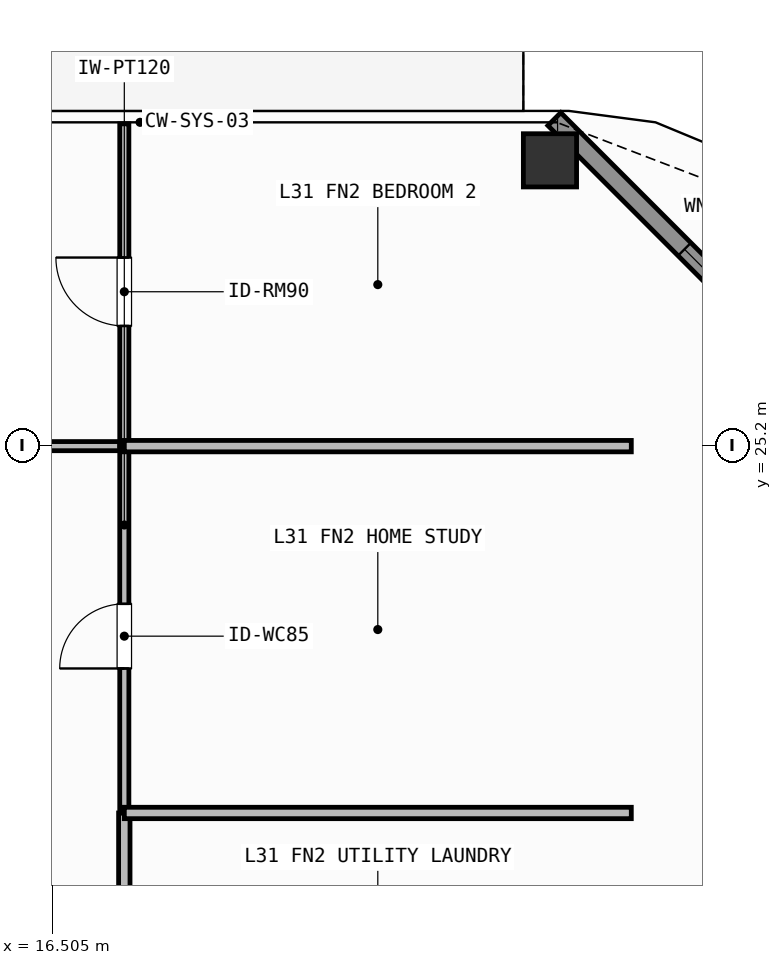
"""IFC4 building model, lengths in metres.
Left out: names, types, materials, properties, quantities, classifications, styles, units other than length and angle.
Written with IfcOpenShell. Run it as: python <this file> out.ifc"""

import sys

from ifc_helpers import new_model, si_unit, direction, frame, frame_2d, origin, origin_2d, place, context, subcontext, project, spatial, rectangle, hollow_rectangle, extrude, element, fill, save


model = new_model("IFC4")
c1 = context("Model", 3, precision=1e-05, world=origin(), true_north=direction((0.0, 1.0)))
c2 = subcontext(c1, "Body", "Model", "MODEL_VIEW")
j1 = project(units=[si_unit("LENGTHUNIT", "METRE"), si_unit("PLANEANGLEUNIT", "RADIAN")], contexts=[c1])
p1 = place(None, origin())
s1 = spatial("IfcSite", under=j1, at=p1, CompositionType="ELEMENT")
p2 = place(p1, origin())
s2 = spatial("IfcBuilding", under=s1, at=p2, CompositionType="ELEMENT")
p3 = place(p2, frame((0.0, 0.0, 125.1)))
s3 = spatial("IfcBuildingStorey", under=s2, at=p3, CompositionType="ELEMENT", Elevation=125.1)
p4 = place(p3, frame((23.05, 28.95, 0.0), z_axis=(0.0, 0.0, 1.0), x_axis=(1.0, 0.0, 0.0)))
e1 = element("IfcColumn", 1, at=p4, inside=s3, PredefinedType="COLUMN", context=c2, shape_type="SweptSolid", body=[
    extrude(hollow_rectangle(XDim=0.7, YDim=0.7, WallThickness=0.032, at=origin_2d()), origin(), (0.0, 0.0, 1.0), 3.9),
])
p5 = place(p3, frame((23.108, 29.492, 0.0), z_axis=(0.0, 0.0, 1.0), x_axis=(0.707087534163, -0.707126027686, 0.0)))
e2 = element("IfcWall", 2, at=p5, inside=s3, PredefinedType="SOLIDWALL", context=c2, shape_type="SweptSolid", body=[
    extrude(rectangle(XDim=6.342, YDim=0.24, at=frame_2d((3.171, 0.0))), origin(), (0.0, 0.0, 1.0), 3.68),
])
p6 = place(p5, frame((2.421, 0.0, 0.8)))
e3 = element("IfcOpeningElement", 3, at=p6, cuts=e2, PredefinedType="OPENING", context=c2, shape_type="SweptSolid", body=[
    extrude(rectangle(XDim=1.5, YDim=1.85, at=frame_2d((0.75, 0.925))), frame((0.0, 0.13, 0.0), z_axis=(0.0, -1.0, 0.0), x_axis=(1.0, 0.0, 0.0)), (0.0, 0.0, 1.0), 0.26),
])
p7 = place(p3, frame((11.444, 25.19, 0.0), z_axis=(0.0, 0.0, 1.0), x_axis=(1.0, 0.0, 0.0)))
e4 = element("IfcWall", 4, at=p7, inside=s3, PredefinedType="PARTITIONING", context=c2, shape_type="SweptSolid", body=[
    extrude(rectangle(XDim=6.006, YDim=0.12, at=frame_2d((3.003, 0.0))), origin(), (0.0, 0.0, 1.0), 3.68),
])
p8 = place(p7, frame((2.642, 0.0, 0.0)))
e5 = element("IfcOpeningElement", 5, at=p8, cuts=e4, PredefinedType="OPENING", context=c2, shape_type="SweptSolid", body=[
    extrude(rectangle(XDim=0.9, YDim=2.1, at=frame_2d((0.45, 1.05))), frame((0.0, 0.07, 0.0), z_axis=(0.0, -1.0, 0.0), x_axis=(1.0, 0.0, 0.0)), (0.0, 0.0, 1.0), 0.14),
])
p9 = place(p3, frame((17.45, 16.802, 0.0), z_axis=(0.0, 0.0, 1.0), x_axis=(0.0, 1.0, 0.0)))
e6 = element("IfcWall", 6, at=p9, inside=s3, PredefinedType="PARTITIONING", context=c2, shape_type="SweptSolid", body=[
    extrude(rectangle(XDim=3.562, YDim=0.15, at=frame_2d((1.781, 0.0))), origin(), (0.0, 0.0, 1.0), 3.68),
])
p10 = place(p9, frame((1.356, 0.0, 0.0)))
e7 = element("IfcOpeningElement", 7, at=p10, cuts=e6, PredefinedType="OPENING", context=c2, shape_type="SweptSolid", body=[
    extrude(rectangle(XDim=0.85, YDim=2.1, at=frame_2d((0.425, 1.05))), frame((0.0, 0.085, 0.0), z_axis=(0.0, -1.0, 0.0), x_axis=(1.0, 0.0, 0.0)), (0.0, 0.0, 1.0), 0.17),
])
p11 = place(p3, frame((17.45, 20.364, 0.0), z_axis=(0.0, 0.0, 1.0), x_axis=(0.0, 1.0, 0.0)))
e8 = element("IfcWall", 8, at=p11, inside=s3, PredefinedType="PARTITIONING", context=c2, shape_type="SweptSolid", body=[
    extrude(rectangle(XDim=4.826, YDim=0.12, at=frame_2d((2.413, 0.0))), origin(), (0.0, 0.0, 1.0), 3.68),
])
p12 = place(p11, frame((1.901, 0.0, 0.0)))
e9 = element("IfcOpeningElement", 9, at=p12, cuts=e8, PredefinedType="OPENING", context=c2, shape_type="SweptSolid", body=[
    extrude(rectangle(XDim=0.85, YDim=2.1, at=frame_2d((0.425, 1.05))), frame((0.0, 0.07, 0.0), z_axis=(0.0, -1.0, 0.0), x_axis=(1.0, 0.0, 0.0)), (0.0, 0.0, 1.0), 0.14),
])
p13 = place(p3, frame((17.45, 25.19, 0.0), z_axis=(0.0, 0.0, 1.0), x_axis=(0.0, 1.0, 0.0)))
e10 = element("IfcWall", 10, at=p13, inside=s3, PredefinedType="PARTITIONING", context=c2, shape_type="SweptSolid", body=[
    extrude(rectangle(XDim=4.24, YDim=0.12, at=frame_2d((2.12, 0.0))), origin(), (0.0, 0.0, 1.0), 3.68),
])
p14 = place(p13, frame((1.581, 0.0, 0.0)))
e11 = element("IfcOpeningElement", 11, at=p14, cuts=e10, PredefinedType="OPENING", context=c2, shape_type="SweptSolid", body=[
    extrude(rectangle(XDim=0.9, YDim=2.1, at=frame_2d((0.45, 1.05))), frame((0.0, 0.07, 0.0), z_axis=(0.0, -1.0, 0.0), x_axis=(1.0, 0.0, 0.0)), (0.0, 0.0, 1.0), 0.14),
])
for number, where, z_axis, x_axis in (
    (12, (17.45, 20.364, 0.0), (0.0, 0.0, 1.0), (1.0, 0.0, 0.0)),
    (13, (17.45, 25.19, 0.0), (0.0, 0.0, 1.0), (1.0, 0.0, 0.0)),
):
    element("IfcWall", number, at=place(p3, frame(where, z_axis=z_axis, x_axis=x_axis)), inside=s3, PredefinedType="PARTITIONING", context=c2, shape_type="SweptSolid", body=[
        extrude(rectangle(XDim=6.67, YDim=0.15, at=frame_2d((3.335, 0.0))), origin(), (0.0, 0.0, 1.0), 3.68),
    ])
p15 = place(p6, origin())
e14 = element("IfcWindow", 14, at=p15, inside=s3, PartitioningType="SINGLE_PANEL", PredefinedType="WINDOW", context=c2, shape_type="SweptSolid", body=[
    extrude(rectangle(XDim=1.5, YDim=1.85, at=frame_2d((0.75, 0.925))), frame((0.0, 0.03, 0.0), z_axis=(0.0, -1.0, 0.0), x_axis=(1.0, 0.0, 0.0)), (0.0, 0.0, 1.0), 0.06),
])
fill(e3, e14)
p16 = place(p12, origin())
e15 = element("IfcDoor", 15, at=p16, inside=s3, OperationType="SINGLE_SWING_LEFT", PredefinedType="DOOR", context=c2, shape_type="SweptSolid", body=[
    extrude(rectangle(XDim=0.85, YDim=2.1, at=frame_2d((0.425, 1.05))), frame((0.0, 0.025, 0.0), z_axis=(0.0, -1.0, 0.0), x_axis=(1.0, 0.0, 0.0)), (0.0, 0.0, 1.0), 0.05),
])
fill(e9, e15)
p17 = place(p14, origin())
e16 = element("IfcDoor", 16, at=p17, inside=s3, OperationType="SINGLE_SWING_RIGHT", PredefinedType="DOOR", context=c2, shape_type="SweptSolid", body=[
    extrude(rectangle(XDim=0.9, YDim=2.1, at=frame_2d((0.45, 1.05))), frame((0.0, 0.025, 0.0), z_axis=(0.0, -1.0, 0.0), x_axis=(1.0, 0.0, 0.0)), (0.0, 0.0, 1.0), 0.05),
])
fill(e11, e16)
save(model, sys.argv[1])
